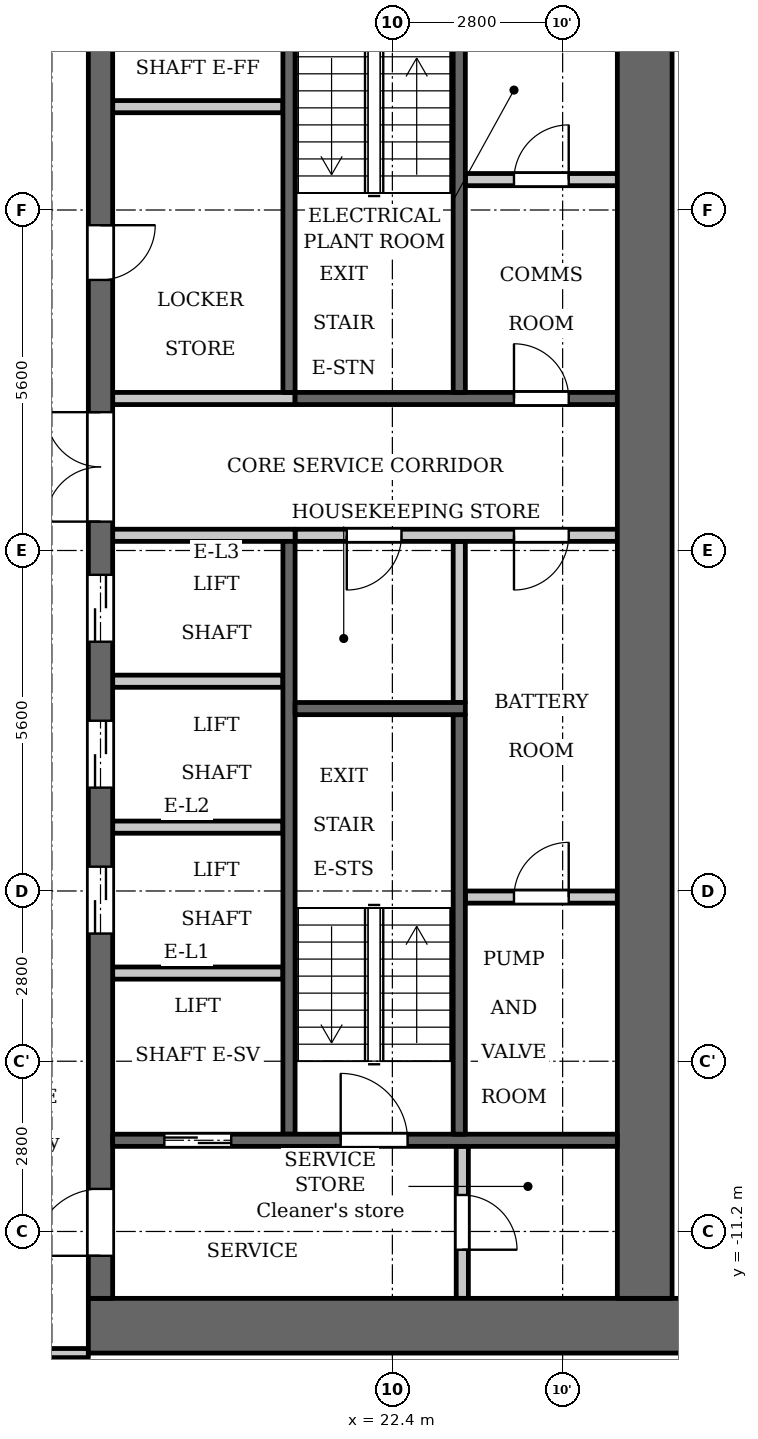
"""IFC4 building model, lengths in metres.
Left out: names, types, materials, properties, quantities, classifications, styles, units other than length and angle.
Written with IfcOpenShell. Run it as: python <this file> out.ifc"""

import sys

from ifc_helpers import new_model, si_unit, direction, frame, frame_2d, origin, place, context, subcontext, project, spatial, rectangle, extrude, element, fill, save


model = new_model("IFC4")
c1 = context("Model", 3, precision=1e-05, world=origin(), true_north=direction((0.0, 1.0)))
c2 = subcontext(c1, "Body", "Model", "MODEL_VIEW")
j1 = project(units=[si_unit("LENGTHUNIT", "METRE"), si_unit("PLANEANGLEUNIT", "RADIAN")], contexts=[c1])
p1 = place(None, origin())
s1 = spatial("IfcSite", under=j1, at=p1, CompositionType="ELEMENT")
p2 = place(p1, origin())
s2 = spatial("IfcBuilding", under=s1, at=p2, CompositionType="ELEMENT")
p3 = place(p2, frame((0.0, 0.0, 51.5)))
s3 = spatial("IfcBuildingStorey", under=s2, at=p3, CompositionType="ELEMENT", Elevation=51.5)
p4 = place(p3, frame((23.5, -2.5, 0.0), z_axis=(0.0, 0.0, 1.0), x_axis=(0.0, 1.0, 0.0)))
e1 = element("IfcWall", 1, at=p4, inside=s3, PredefinedType="PARTITIONING", context=c2, shape_type="SweptSolid", body=[
    extrude(rectangle(XDim=2.65, YDim=0.2, at=frame_2d((1.325, 0.0))), origin(), (0.0, 0.0, 1.0), 3.2),
])
p5 = place(p3, frame((20.7, 2.6, 0.0), z_axis=(0.0, 0.0, 1.0), x_axis=(0.0, 1.0, 0.0)))
e2 = element("IfcWall", 2, at=p5, inside=s3, PredefinedType="SHEAR", context=c2, shape_type="SweptSolid", body=[
    extrude(rectangle(XDim=7.0, YDim=0.2, at=frame_2d((3.5, 0.0))), origin(), (0.0, 0.0, 1.0), 3.2),
])
p6 = place(p3, frame((20.7, -9.6, 0.0), z_axis=(0.0, 0.0, 1.0), x_axis=(0.0, 1.0, 0.0)))
e3 = element("IfcWall", 3, at=p6, inside=s3, PredefinedType="SHEAR", context=c2, shape_type="SweptSolid", body=[
    extrude(rectangle(XDim=9.75, YDim=0.2, at=frame_2d((4.875, 0.0))), origin(), (0.0, 0.0, 1.0), 3.2),
])
p7 = place(p3, frame((20.8, 2.5, 0.0), z_axis=(0.0, 0.0, 1.0), x_axis=(1.0, 0.0, 0.0)))
e4 = element("IfcWall", 4, at=p7, inside=s3, PredefinedType="SHEAR", context=c2, shape_type="SweptSolid", body=[
    extrude(rectangle(XDim=5.3, YDim=0.2, at=frame_2d((2.65, 0.0))), origin(), (0.0, 0.0, 1.0), 3.2),
])
p8 = place(p7, frame((3.6, 0.0, 0.0)))
e5 = element("IfcOpeningElement", 5, at=p8, cuts=e4, PredefinedType="OPENING", context=c2, shape_type="SweptSolid", body=[
    extrude(rectangle(XDim=0.9, YDim=2.1, at=frame_2d((0.45, 1.05))), frame((0.0, 0.11, 0.0), z_axis=(0.0, -1.0, 0.0), x_axis=(1.0, 0.0, 0.0)), (0.0, 0.0, 1.0), 0.22),
])
p9 = place(p3, frame((20.8, 0.25, 0.0), z_axis=(0.0, 0.0, 1.0), x_axis=(1.0, 0.0, 0.0)))
e6 = element("IfcWall", 6, at=p9, inside=s3, PredefinedType="PARTITIONING", context=c2, shape_type="SweptSolid", body=[
    extrude(rectangle(XDim=5.3, YDim=0.2, at=frame_2d((2.65, 0.0))), origin(), (0.0, 0.0, 1.0), 3.2),
])
p10 = place(p9, frame((0.85, 0.0, 0.0)))
e7 = element("IfcOpeningElement", 7, at=p10, cuts=e6, PredefinedType="OPENING", context=c2, shape_type="SweptSolid", body=[
    extrude(rectangle(XDim=0.9, YDim=2.1, at=frame_2d((0.45, 1.05))), frame((0.0, 0.11, 0.0), z_axis=(0.0, -1.0, 0.0), x_axis=(1.0, 0.0, 0.0)), (0.0, 0.0, 1.0), 0.22),
])
p11 = place(p9, frame((3.6, 0.0, 0.0)))
e8 = element("IfcOpeningElement", 8, at=p11, cuts=e6, PredefinedType="OPENING", context=c2, shape_type="SweptSolid", body=[
    extrude(rectangle(XDim=0.9, YDim=2.1, at=frame_2d((0.45, 1.05))), frame((0.0, 0.11, 0.0), z_axis=(0.0, -1.0, 0.0), x_axis=(1.0, 0.0, 0.0)), (0.0, 0.0, 1.0), 0.22),
])
p12 = place(p3, frame((17.4, -12.75, 0.0), z_axis=(0.0, 0.0, 1.0), x_axis=(1.0, 0.0, 0.0)))
e9 = element("IfcWall", 9, at=p12, inside=s3, PredefinedType="SHEAR", context=c2, shape_type="SweptSolid", body=[
    extrude(rectangle(XDim=10.4, YDim=0.9, at=frame_2d((5.2, 0.0))), origin(), (0.0, 0.0, 1.0), 3.2),
])
p13 = place(p3, frame((17.6, -12.3, 0.0), z_axis=(0.0, 0.0, 1.0), x_axis=(0.0, 1.0, 0.0)))
e10 = element("IfcWall", 10, at=p13, inside=s3, PredefinedType="SHEAR", context=c2, shape_type="SweptSolid", body=[
    extrude(rectangle(XDim=24.6, YDim=0.4, at=frame_2d((12.3, 0.0))), origin(), (0.0, 0.0, 1.0), 3.2),
])
p14 = place(p13, frame((6.0, 0.0, 0.0)))
e11 = element("IfcOpeningElement", 11, at=p14, cuts=e10, PredefinedType="OPENING", context=c2, shape_type="SweptSolid", body=[
    extrude(rectangle(XDim=1.1, YDim=2.1, at=frame_2d((0.55, 1.05))), frame((0.0, 0.21, 0.0), z_axis=(0.0, -1.0, 0.0), x_axis=(1.0, 0.0, 0.0)), (0.0, 0.0, 1.0), 0.42),
])
p15 = place(p13, frame((8.4, 0.0, 0.0)))
e12 = element("IfcOpeningElement", 12, at=p15, cuts=e10, PredefinedType="OPENING", context=c2, shape_type="SweptSolid", body=[
    extrude(rectangle(XDim=1.1, YDim=2.1, at=frame_2d((0.55, 1.05))), frame((0.0, 0.21, 0.0), z_axis=(0.0, -1.0, 0.0), x_axis=(1.0, 0.0, 0.0)), (0.0, 0.0, 1.0), 0.42),
])
p16 = place(p13, frame((10.8, 0.0, 0.0)))
e13 = element("IfcOpeningElement", 13, at=p16, cuts=e10, PredefinedType="OPENING", context=c2, shape_type="SweptSolid", body=[
    extrude(rectangle(XDim=1.1, YDim=2.1, at=frame_2d((0.55, 1.05))), frame((0.0, 0.21, 0.0), z_axis=(0.0, -1.0, 0.0), x_axis=(1.0, 0.0, 0.0)), (0.0, 0.0, 1.0), 0.42),
])
p17 = place(p13, frame((16.75, 0.0, 0.0)))
e14 = element("IfcOpeningElement", 14, at=p17, cuts=e10, PredefinedType="OPENING", context=c2, shape_type="SweptSolid", body=[
    extrude(rectangle(XDim=0.9, YDim=2.1, at=frame_2d((0.45, 1.05))), frame((0.0, 0.21, 0.0), z_axis=(0.0, -1.0, 0.0), x_axis=(1.0, 0.0, 0.0)), (0.0, 0.0, 1.0), 0.42),
])
p18 = place(p13, frame((22.8, 0.0, 0.0)))
e15 = element("IfcOpeningElement", 15, at=p18, cuts=e10, PredefinedType="OPENING", context=c2, shape_type="SweptSolid", body=[
    extrude(rectangle(XDim=1.1, YDim=2.1, at=frame_2d((0.55, 1.05))), frame((0.0, 0.21, 0.0), z_axis=(0.0, -1.0, 0.0), x_axis=(1.0, 0.0, 0.0)), (0.0, 0.0, 1.0), 0.42),
])
p19 = place(p13, frame((0.7, 0.0, 0.0)))
e16 = element("IfcOpeningElement", 16, at=p19, cuts=e10, PredefinedType="OPENING", context=c2, shape_type="SweptSolid", body=[
    extrude(rectangle(XDim=1.1, YDim=2.1, at=frame_2d((0.55, 1.05))), frame((0.0, 0.21, 0.0), z_axis=(0.0, -1.0, 0.0), x_axis=(1.0, 0.0, 0.0)), (0.0, 0.0, 1.0), 0.42),
])
p20 = place(p13, frame((12.775, 0.0, 0.0)))
e17 = element("IfcOpeningElement", 17, at=p20, cuts=e10, PredefinedType="OPENING", context=c2, shape_type="SweptSolid", body=[
    extrude(rectangle(XDim=1.8, YDim=2.1, at=frame_2d((0.9, 1.05))), frame((0.0, 0.21, 0.0), z_axis=(0.0, -1.0, 0.0), x_axis=(1.0, 0.0, 0.0)), (0.0, 0.0, 1.0), 0.42),
])
p21 = place(p3, frame((26.55, -12.3, 0.0), z_axis=(0.0, 0.0, 1.0), x_axis=(0.0, 1.0, 0.0)))
e18 = element("IfcWall", 18, at=p21, inside=s3, PredefinedType="SHEAR", context=c2, shape_type="SweptSolid", body=[
    extrude(rectangle(XDim=24.6, YDim=0.9, at=frame_2d((12.3, 0.0))), origin(), (0.0, 0.0, 1.0), 3.2),
])
p22 = place(p3, frame((23.55, -12.3, 0.0), z_axis=(0.0, 0.0, 1.0), x_axis=(0.0, 1.0, 0.0)))
e19 = element("IfcWall", 19, at=p22, inside=s3, PredefinedType="PARTITIONING", context=c2, shape_type="SweptSolid", body=[
    extrude(rectangle(XDim=2.5, YDim=0.2, at=frame_2d((1.25, 0.0))), origin(), (0.0, 0.0, 1.0), 3.2),
])
p23 = place(p22, frame((0.8, 0.0, 0.0)))
e20 = element("IfcOpeningElement", 20, at=p23, cuts=e19, PredefinedType="OPENING", context=c2, shape_type="SweptSolid", body=[
    extrude(rectangle(XDim=0.9, YDim=2.1, at=frame_2d((0.45, 1.05))), frame((0.0, 0.11, 0.0), z_axis=(0.0, -1.0, 0.0), x_axis=(1.0, 0.0, 0.0)), (0.0, 0.0, 1.0), 0.22),
])
p24 = place(p3, frame((23.6, -5.7, 0.0), z_axis=(0.0, 0.0, 1.0), x_axis=(1.0, 0.0, 0.0)))
e21 = element("IfcWall", 21, at=p24, inside=s3, PredefinedType="PARTITIONING", context=c2, shape_type="SweptSolid", body=[
    extrude(rectangle(XDim=2.5, YDim=0.2, at=frame_2d((1.25, 0.0))), origin(), (0.0, 0.0, 1.0), 3.2),
])
p25 = place(p24, frame((0.8, 0.0, 0.0)))
e22 = element("IfcOpeningElement", 22, at=p25, cuts=e21, PredefinedType="OPENING", context=c2, shape_type="SweptSolid", body=[
    extrude(rectangle(XDim=0.9, YDim=2.1, at=frame_2d((0.45, 1.05))), frame((0.0, 0.11, 0.0), z_axis=(0.0, -1.0, 0.0), x_axis=(1.0, 0.0, 0.0)), (0.0, 0.0, 1.0), 0.22),
])
p26 = place(p3, frame((23.6, 6.1, 0.0), z_axis=(0.0, 0.0, 1.0), x_axis=(1.0, 0.0, 0.0)))
e23 = element("IfcWall", 23, at=p26, inside=s3, PredefinedType="PARTITIONING", context=c2, shape_type="SweptSolid", body=[
    extrude(rectangle(XDim=2.5, YDim=0.2, at=frame_2d((1.25, 0.0))), origin(), (0.0, 0.0, 1.0), 3.2),
])
p27 = place(p26, frame((0.8, 0.0, 0.0)))
e24 = element("IfcOpeningElement", 24, at=p27, cuts=e23, PredefinedType="OPENING", context=c2, shape_type="SweptSolid", body=[
    extrude(rectangle(XDim=0.9, YDim=2.1, at=frame_2d((0.45, 1.05))), frame((0.0, 0.11, 0.0), z_axis=(0.0, -1.0, 0.0), x_axis=(1.0, 0.0, 0.0)), (0.0, 0.0, 1.0), 0.22),
])
p28 = place(p3, frame((17.8, -9.7, 0.0), z_axis=(0.0, 0.0, 1.0), x_axis=(1.0, 0.0, 0.0)))
e25 = element("IfcWall", 25, at=p28, inside=s3, PredefinedType="SHEAR", context=c2, shape_type="SweptSolid", body=[
    extrude(rectangle(XDim=8.3, YDim=0.2, at=frame_2d((4.15, 0.0))), origin(), (0.0, 0.0, 1.0), 3.2),
])
p29 = place(p28, frame((0.85, 0.0, 0.0)))
e26 = element("IfcOpeningElement", 26, at=p29, cuts=e25, PredefinedType="OPENING", context=c2, shape_type="SweptSolid", body=[
    extrude(rectangle(XDim=1.1, YDim=2.1, at=frame_2d((0.55, 1.05))), frame((0.0, 0.11, 0.0), z_axis=(0.0, -1.0, 0.0), x_axis=(1.0, 0.0, 0.0)), (0.0, 0.0, 1.0), 0.22),
])
p30 = place(p28, frame((3.75, 0.0, 0.0)))
e27 = element("IfcOpeningElement", 27, at=p30, cuts=e25, PredefinedType="OPENING", context=c2, shape_type="SweptSolid", body=[
    extrude(rectangle(XDim=1.1, YDim=2.1, at=frame_2d((0.55, 1.05))), frame((0.0, 0.11, 0.0), z_axis=(0.0, -1.0, 0.0), x_axis=(1.0, 0.0, 0.0)), (0.0, 0.0, 1.0), 0.22),
])
for number, where, z_axis, x_axis in (
    (28, (17.8, -6.95, 0.0), (0.0, 0.0, 1.0), (1.0, 0.0, 0.0)),
    (29, (17.8, -4.55, 0.0), (0.0, 0.0, 1.0), (1.0, 0.0, 0.0)),
    (30, (17.8, -2.15, 0.0), (0.0, 0.0, 1.0), (1.0, 0.0, 0.0)),
):
    element("IfcWall", number, at=place(p3, frame(where, z_axis=z_axis, x_axis=x_axis)), inside=s3, PredefinedType="PARTITIONING", context=c2, shape_type="SweptSolid", body=[
        extrude(rectangle(XDim=2.8, YDim=0.2, at=frame_2d((1.4, 0.0))), origin(), (0.0, 0.0, 1.0), 3.2),
    ])
for number, where, z_axis, x_axis in (
    (31, (17.8, 0.25, 0.0), (0.0, 0.0, 1.0), (1.0, 0.0, 0.0)),
    (32, (17.8, 2.5, 0.0), (0.0, 0.0, 1.0), (1.0, 0.0, 0.0)),
):
    element("IfcWall", number, at=place(p3, frame(where, z_axis=z_axis, x_axis=x_axis)), inside=s3, PredefinedType="PARTITIONING", context=c2, shape_type="SweptSolid", body=[
        extrude(rectangle(XDim=3.0, YDim=0.2, at=frame_2d((1.5, 0.0))), origin(), (0.0, 0.0, 1.0), 3.2),
    ])
p31 = place(p3, frame((17.8, 7.3, 0.0), z_axis=(0.0, 0.0, 1.0), x_axis=(1.0, 0.0, 0.0)))
e33 = element("IfcWall", 33, at=p31, inside=s3, PredefinedType="PARTITIONING", context=c2, shape_type="SweptSolid", body=[
    extrude(rectangle(XDim=2.8, YDim=0.2, at=frame_2d((1.4, 0.0))), origin(), (0.0, 0.0, 1.0), 3.2),
])
p32 = place(p3, frame((23.5, 2.6, 0.0), z_axis=(0.0, 0.0, 1.0), x_axis=(0.0, 1.0, 0.0)))
e34 = element("IfcWall", 34, at=p32, inside=s3, PredefinedType="SHEAR", context=c2, shape_type="SweptSolid", body=[
    extrude(rectangle(XDim=7.0, YDim=0.2, at=frame_2d((3.5, 0.0))), origin(), (0.0, 0.0, 1.0), 3.2),
])
p33 = place(p3, frame((23.5, -9.6, 0.0), z_axis=(0.0, 0.0, 1.0), x_axis=(0.0, 1.0, 0.0)))
e35 = element("IfcWall", 35, at=p33, inside=s3, PredefinedType="SHEAR", context=c2, shape_type="SweptSolid", body=[
    extrude(rectangle(XDim=6.9, YDim=0.2, at=frame_2d((3.45, 0.0))), origin(), (0.0, 0.0, 1.0), 3.2),
])
p34 = place(p3, frame((20.8, -2.6, 0.0), z_axis=(0.0, 0.0, 1.0), x_axis=(1.0, 0.0, 0.0)))
e36 = element("IfcWall", 36, at=p34, inside=s3, PredefinedType="SHEAR", context=c2, shape_type="SweptSolid", body=[
    extrude(rectangle(XDim=2.8, YDim=0.2, at=frame_2d((1.4, 0.0))), origin(), (0.0, 0.0, 1.0), 3.2),
])
p35 = place(p3, frame((-17.4, -13.2, 0.0), z_axis=(0.0, 0.0, 1.0), x_axis=(1.0, 0.0, 0.0)))
e37 = element("IfcWall", 37, at=p35, inside=s3, PredefinedType="PARTITIONING", context=c2, shape_type="SweptSolid", body=[
    extrude(rectangle(XDim=34.8, YDim=0.15, at=frame_2d((17.4, 0.0))), origin(), (0.0, 0.0, 1.0), 3.2),
])
p36 = place(p35, frame((0.65, 0.0, 0.0)))
e38 = element("IfcOpeningElement", 38, at=p36, cuts=e37, PredefinedType="OPENING", context=c2, shape_type="SweptSolid", body=[
    extrude(rectangle(XDim=1.0, YDim=2.1, at=frame_2d((0.5, 1.05))), frame((0.0, 0.085, 0.0), z_axis=(0.0, -1.0, 0.0), x_axis=(1.0, 0.0, 0.0)), (0.0, 0.0, 1.0), 0.17),
])
p37 = place(p35, frame((33.05, 0.0, 0.0)))
e39 = element("IfcOpeningElement", 39, at=p37, cuts=e37, PredefinedType="OPENING", context=c2, shape_type="SweptSolid", body=[
    extrude(rectangle(XDim=1.0, YDim=2.1, at=frame_2d((0.5, 1.05))), frame((0.0, 0.085, 0.0), z_axis=(0.0, -1.0, 0.0), x_axis=(1.0, 0.0, 0.0)), (0.0, 0.0, 1.0), 0.17),
])
p38 = place(p35, frame((10.15, 0.0, 0.0)))
e40 = element("IfcOpeningElement", 40, at=p38, cuts=e37, PredefinedType="OPENING", context=c2, shape_type="SweptSolid", body=[
    extrude(rectangle(XDim=1.0, YDim=2.1, at=frame_2d((0.5, 1.05))), frame((0.0, 0.085, 0.0), z_axis=(0.0, -1.0, 0.0), x_axis=(1.0, 0.0, 0.0)), (0.0, 0.0, 1.0), 0.17),
])
p39 = place(p35, frame((21.35, 0.0, 0.0)))
e41 = element("IfcOpeningElement", 41, at=p39, cuts=e37, PredefinedType="OPENING", context=c2, shape_type="SweptSolid", body=[
    extrude(rectangle(XDim=1.0, YDim=2.1, at=frame_2d((0.5, 1.05))), frame((0.0, 0.085, 0.0), z_axis=(0.0, -1.0, 0.0), x_axis=(1.0, 0.0, 0.0)), (0.0, 0.0, 1.0), 0.17),
])
p40 = place(p35, frame((30.75, 0.0, 0.0)))
e42 = element("IfcOpeningElement", 42, at=p40, cuts=e37, PredefinedType="OPENING", context=c2, shape_type="SweptSolid", body=[
    extrude(rectangle(XDim=1.0, YDim=2.1, at=frame_2d((0.5, 1.05))), frame((0.0, 0.085, 0.0), z_axis=(0.0, -1.0, 0.0), x_axis=(1.0, 0.0, 0.0)), (0.0, 0.0, 1.0), 0.17),
])
p41 = place(p29, origin())
e43 = element("IfcDoor", 43, at=p41, inside=s3, OperationType="DOUBLE_DOOR_SLIDING", PredefinedType="DOOR", context=c2, shape_type="SweptSolid", body=[
    extrude(rectangle(XDim=1.1, YDim=2.1, at=frame_2d((0.55, 1.05))), frame((0.0, 0.025, 0.0), z_axis=(0.0, -1.0, 0.0), x_axis=(1.0, 0.0, 0.0)), (0.0, 0.0, 1.0), 0.05),
])
fill(e26, e43)
p42 = place(p14, origin())
e44 = element("IfcDoor", 44, at=p42, inside=s3, OperationType="DOUBLE_DOOR_SLIDING", PredefinedType="DOOR", context=c2, shape_type="SweptSolid", body=[
    extrude(rectangle(XDim=1.1, YDim=2.1, at=frame_2d((0.55, 1.05))), frame((0.0, 0.025, 0.0), z_axis=(0.0, -1.0, 0.0), x_axis=(1.0, 0.0, 0.0)), (0.0, 0.0, 1.0), 0.05),
])
fill(e11, e44)
p43 = place(p15, origin())
e45 = element("IfcDoor", 45, at=p43, inside=s3, OperationType="DOUBLE_DOOR_SLIDING", PredefinedType="DOOR", context=c2, shape_type="SweptSolid", body=[
    extrude(rectangle(XDim=1.1, YDim=2.1, at=frame_2d((0.55, 1.05))), frame((0.0, 0.025, 0.0), z_axis=(0.0, -1.0, 0.0), x_axis=(1.0, 0.0, 0.0)), (0.0, 0.0, 1.0), 0.05),
])
fill(e12, e45)
p44 = place(p16, origin())
e46 = element("IfcDoor", 46, at=p44, inside=s3, OperationType="DOUBLE_DOOR_SLIDING", PredefinedType="DOOR", context=c2, shape_type="SweptSolid", body=[
    extrude(rectangle(XDim=1.1, YDim=2.1, at=frame_2d((0.55, 1.05))), frame((0.0, 0.025, 0.0), z_axis=(0.0, -1.0, 0.0), x_axis=(1.0, 0.0, 0.0)), (0.0, 0.0, 1.0), 0.05),
])
fill(e13, e46)
p45 = place(p17, origin())
e47 = element("IfcDoor", 47, at=p45, inside=s3, OperationType="SINGLE_SWING_RIGHT", PredefinedType="DOOR", context=c2, shape_type="SweptSolid", body=[
    extrude(rectangle(XDim=0.9, YDim=2.1, at=frame_2d((0.45, 1.05))), frame((0.0, 0.025, 0.0), z_axis=(0.0, -1.0, 0.0), x_axis=(1.0, 0.0, 0.0)), (0.0, 0.0, 1.0), 0.05),
])
fill(e14, e47)
p46 = place(p19, origin())
e48 = element("IfcDoor", 48, at=p46, inside=s3, OperationType="SINGLE_SWING_RIGHT", PredefinedType="DOOR", context=c2, shape_type="SweptSolid", body=[
    extrude(rectangle(XDim=1.1, YDim=2.1, at=frame_2d((0.55, 1.05))), frame((0.0, 0.025, 0.0), z_axis=(0.0, -1.0, 0.0), x_axis=(1.0, 0.0, 0.0)), (0.0, 0.0, 1.0), 0.05),
])
fill(e16, e48)
p47 = place(p23, origin())
e49 = element("IfcDoor", 49, at=p47, inside=s3, OperationType="SINGLE_SWING_LEFT", PredefinedType="DOOR", context=c2, shape_type="SweptSolid", body=[
    extrude(rectangle(XDim=0.9, YDim=2.1, at=frame_2d((0.45, 1.05))), frame((0.0, 0.025, 0.0), z_axis=(0.0, -1.0, 0.0), x_axis=(1.0, 0.0, 0.0)), (0.0, 0.0, 1.0), 0.05),
])
fill(e20, e49)
p48 = place(p30, origin())
e50 = element("IfcDoor", 50, at=p48, inside=s3, OperationType="SINGLE_SWING_RIGHT", PredefinedType="DOOR", context=c2, shape_type="SweptSolid", body=[
    extrude(rectangle(XDim=1.1, YDim=2.1, at=frame_2d((0.55, 1.05))), frame((0.0, 0.025, 0.0), z_axis=(0.0, -1.0, 0.0), x_axis=(1.0, 0.0, 0.0)), (0.0, 0.0, 1.0), 0.05),
])
fill(e27, e50)
p49 = place(p20, origin())
e51 = element("IfcDoor", 51, at=p49, inside=s3, OperationType="DOUBLE_DOOR_SINGLE_SWING", PredefinedType="DOOR", context=c2, shape_type="SweptSolid", body=[
    extrude(rectangle(XDim=1.8, YDim=2.1, at=frame_2d((0.9, 1.05))), frame((0.0, 0.025, 0.0), z_axis=(0.0, -1.0, 0.0), x_axis=(1.0, 0.0, 0.0)), (0.0, 0.0, 1.0), 0.05),
])
fill(e17, e51)
p50 = place(p10, origin())
e52 = element("IfcDoor", 52, at=p50, inside=s3, OperationType="SINGLE_SWING_LEFT", PredefinedType="DOOR", context=c2, shape_type="SweptSolid", body=[
    extrude(rectangle(XDim=0.9, YDim=2.1, at=frame_2d((0.45, 1.05))), frame((0.0, 0.025, 0.0), z_axis=(0.0, -1.0, 0.0), x_axis=(1.0, 0.0, 0.0)), (0.0, 0.0, 1.0), 0.05),
])
fill(e7, e52)
p51 = place(p25, origin())
e53 = element("IfcDoor", 53, at=p51, inside=s3, OperationType="SINGLE_SWING_LEFT", PredefinedType="DOOR", context=c2, shape_type="SweptSolid", body=[
    extrude(rectangle(XDim=0.9, YDim=2.1, at=frame_2d((0.45, 1.05))), frame((0.0, 0.025, 0.0), z_axis=(0.0, -1.0, 0.0), x_axis=(1.0, 0.0, 0.0)), (0.0, 0.0, 1.0), 0.05),
])
fill(e22, e53)
p52 = place(p11, origin())
e54 = element("IfcDoor", 54, at=p52, inside=s3, OperationType="SINGLE_SWING_LEFT", PredefinedType="DOOR", context=c2, shape_type="SweptSolid", body=[
    extrude(rectangle(XDim=0.9, YDim=2.1, at=frame_2d((0.45, 1.05))), frame((0.0, 0.025, 0.0), z_axis=(0.0, -1.0, 0.0), x_axis=(1.0, 0.0, 0.0)), (0.0, 0.0, 1.0), 0.05),
])
fill(e8, e54)
p53 = place(p27, origin())
e55 = element("IfcDoor", 55, at=p53, inside=s3, OperationType="SINGLE_SWING_LEFT", PredefinedType="DOOR", context=c2, shape_type="SweptSolid", body=[
    extrude(rectangle(XDim=0.9, YDim=2.1, at=frame_2d((0.45, 1.05))), frame((0.0, 0.025, 0.0), z_axis=(0.0, -1.0, 0.0), x_axis=(1.0, 0.0, 0.0)), (0.0, 0.0, 1.0), 0.05),
])
fill(e24, e55)
p54 = place(p8, origin())
e56 = element("IfcDoor", 56, at=p54, inside=s3, OperationType="SINGLE_SWING_RIGHT", PredefinedType="DOOR", context=c2, shape_type="SweptSolid", body=[
    extrude(rectangle(XDim=0.9, YDim=2.1, at=frame_2d((0.45, 1.05))), frame((0.0, 0.025, 0.0), z_axis=(0.0, -1.0, 0.0), x_axis=(1.0, 0.0, 0.0)), (0.0, 0.0, 1.0), 0.05),
])
fill(e5, e56)
save(model, sys.argv[1])
